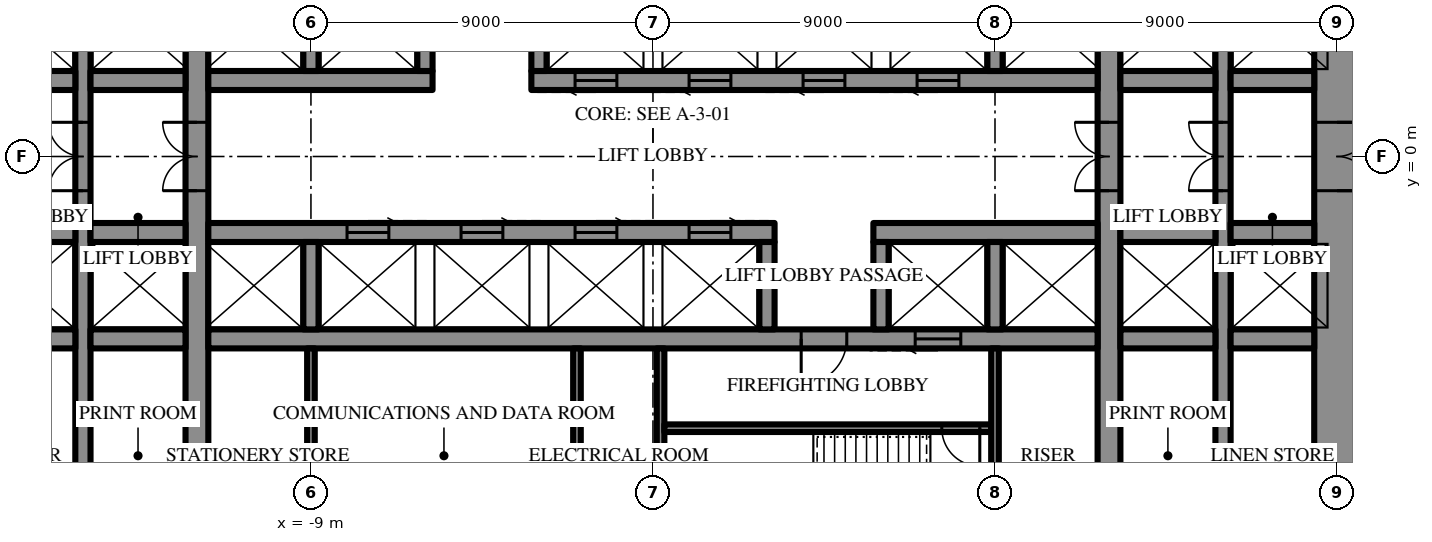
"""IFC4 building model, lengths in metres.
Left out: names, types, materials, properties, quantities, classifications, styles, units other than length and angle.
Written with IfcOpenShell. Run it as: python <this file> out.ifc"""

import sys

from ifc_helpers import new_model, si_unit, direction, frame, frame_2d, origin, place, context, subcontext, project, spatial, rectangle, extrude, element, fill, save


model = new_model("IFC4")
c1 = context("Model", 3, precision=1e-05, world=origin(), true_north=direction((0.0, 1.0)))
c2 = subcontext(c1, "Body", "Model", "MODEL_VIEW")
j1 = project(units=[si_unit("LENGTHUNIT", "METRE"), si_unit("PLANEANGLEUNIT", "RADIAN")], contexts=[c1])
p1 = place(None, origin())
s1 = spatial("IfcSite", under=j1, at=p1, CompositionType="ELEMENT")
p2 = place(p1, origin())
s2 = spatial("IfcBuilding", under=s1, at=p2, CompositionType="ELEMENT")
p3 = place(p2, frame((0.0, 0.0, 103.3)))
s3 = spatial("IfcBuildingStorey", under=s2, at=p3, CompositionType="ELEMENT", Elevation=103.3)
p4 = place(p3, frame((18.0, -10.7, 0.0), z_axis=(0.0, 0.0, 1.0), x_axis=(0.0, 1.0, 0.0)))
e1 = element("IfcWall", 1, at=p4, inside=s3, PredefinedType="SHEAR", context=c2, shape_type="SweptSolid", body=[
    extrude(rectangle(XDim=21.4, YDim=1.2, at=frame_2d((10.7, 0.0))), origin(), (0.0, 0.0, 1.0), 4.2),
])
p5 = place(p4, frame((9.8, 0.0, 0.0)))
e2 = element("IfcOpeningElement", 2, at=p5, cuts=e1, PredefinedType="OPENING", context=c2, shape_type="SweptSolid", body=[
    extrude(rectangle(XDim=1.8, YDim=2.4, at=frame_2d((0.9, 1.2))), frame((0.0, 0.61, 0.0), z_axis=(0.0, -1.0, 0.0), x_axis=(1.0, 0.0, 0.0)), (0.0, 0.0, 1.0), 1.22),
])
p6 = place(p3, frame((12.0, -10.7, 0.0), z_axis=(0.0, 0.0, 1.0), x_axis=(0.0, 1.0, 0.0)))
e3 = element("IfcWall", 3, at=p6, inside=s3, PredefinedType="SHEAR", context=c2, shape_type="SweptSolid", body=[
    extrude(rectangle(XDim=21.4, YDim=0.6, at=frame_2d((10.7, 0.0))), origin(), (0.0, 0.0, 1.0), 4.2),
])
p7 = place(p6, frame((9.8, 0.0, 0.0)))
e4 = element("IfcOpeningElement", 4, at=p7, cuts=e3, PredefinedType="OPENING", context=c2, shape_type="SweptSolid", body=[
    extrude(rectangle(XDim=1.8, YDim=2.4, at=frame_2d((0.9, 1.2))), frame((0.0, 0.31, 0.0), z_axis=(0.0, -1.0, 0.0), x_axis=(1.0, 0.0, 0.0)), (0.0, 0.0, 1.0), 0.62),
])
p8 = place(p3, frame((-12.0, -10.7, 0.0), z_axis=(0.0, 0.0, 1.0), x_axis=(0.0, 1.0, 0.0)))
e5 = element("IfcWall", 5, at=p8, inside=s3, PredefinedType="SHEAR", context=c2, shape_type="SweptSolid", body=[
    extrude(rectangle(XDim=21.4, YDim=0.6, at=frame_2d((10.7, 0.0))), origin(), (0.0, 0.0, 1.0), 4.2),
])
p9 = place(p8, frame((9.8, 0.0, 0.0)))
e6 = element("IfcOpeningElement", 6, at=p9, cuts=e5, PredefinedType="OPENING", context=c2, shape_type="SweptSolid", body=[
    extrude(rectangle(XDim=1.8, YDim=2.4, at=frame_2d((0.9, 1.2))), frame((0.0, 0.31, 0.0), z_axis=(0.0, -1.0, 0.0), x_axis=(1.0, 0.0, 0.0)), (0.0, 0.0, 1.0), 0.62),
])
p10 = place(p3, frame((15.0, -10.7, 0.0), z_axis=(0.0, 0.0, 1.0), x_axis=(0.0, 1.0, 0.0)))
e7 = element("IfcWall", 7, at=p10, inside=s3, PredefinedType="SHEAR", context=c2, shape_type="SweptSolid", body=[
    extrude(rectangle(XDim=21.4, YDim=0.4, at=frame_2d((10.7, 0.0))), origin(), (0.0, 0.0, 1.0), 4.2),
])
p11 = place(p10, frame((9.8, 0.0, 0.0)))
e8 = element("IfcOpeningElement", 8, at=p11, cuts=e7, PredefinedType="OPENING", context=c2, shape_type="SweptSolid", body=[
    extrude(rectangle(XDim=1.8, YDim=2.4, at=frame_2d((0.9, 1.2))), frame((0.0, 0.21, 0.0), z_axis=(0.0, -1.0, 0.0), x_axis=(1.0, 0.0, 0.0)), (0.0, 0.0, 1.0), 0.42),
])
p12 = place(p3, frame((-15.0, -10.7, 0.0), z_axis=(0.0, 0.0, 1.0), x_axis=(0.0, 1.0, 0.0)))
e9 = element("IfcWall", 9, at=p12, inside=s3, PredefinedType="SHEAR", context=c2, shape_type="SweptSolid", body=[
    extrude(rectangle(XDim=21.4, YDim=0.4, at=frame_2d((10.7, 0.0))), origin(), (0.0, 0.0, 1.0), 4.2),
])
p13 = place(p12, frame((9.8, 0.0, 0.0)))
e10 = element("IfcOpeningElement", 10, at=p13, cuts=e9, PredefinedType="OPENING", context=c2, shape_type="SweptSolid", body=[
    extrude(rectangle(XDim=1.8, YDim=2.4, at=frame_2d((0.9, 1.2))), frame((0.0, 0.21, 0.0), z_axis=(0.0, -1.0, 0.0), x_axis=(1.0, 0.0, 0.0)), (0.0, 0.0, 1.0), 0.42),
])
p14 = place(p3, frame((-17.4, 2.0, 0.0), z_axis=(0.0, 0.0, 1.0), x_axis=(1.0, 0.0, 0.0)))
e11 = element("IfcWall", 11, at=p14, inside=s3, PredefinedType="SHEAR", context=c2, shape_type="SweptSolid", body=[
    extrude(rectangle(XDim=2.2, YDim=0.5, at=frame_2d((1.1, 0.0))), origin(), (0.0, 0.0, 1.0), 4.2),
])
p15 = place(p3, frame((-14.8, 2.0, 0.0), z_axis=(0.0, 0.0, 1.0), x_axis=(1.0, 0.0, 0.0)))
e12 = element("IfcWall", 12, at=p15, inside=s3, PredefinedType="SHEAR", context=c2, shape_type="SweptSolid", body=[
    extrude(rectangle(XDim=2.5, YDim=0.5, at=frame_2d((1.25, 0.0))), origin(), (0.0, 0.0, 1.0), 4.2),
])
p16 = place(p3, frame((-11.7, 2.0, 0.0), z_axis=(0.0, 0.0, 1.0), x_axis=(1.0, 0.0, 0.0)))
e13 = element("IfcWall", 13, at=p16, inside=s3, PredefinedType="SHEAR", context=c2, shape_type="SweptSolid", body=[
    extrude(rectangle(XDim=5.9, YDim=0.5, at=frame_2d((2.95, 0.0))), origin(), (0.0, 0.0, 1.0), 4.2),
])
p17 = place(p3, frame((-3.2, 2.0, 0.0), z_axis=(0.0, 0.0, 1.0), x_axis=(1.0, 0.0, 0.0)))
e14 = element("IfcWall", 14, at=p17, inside=s3, PredefinedType="SHEAR", context=c2, shape_type="SweptSolid", body=[
    extrude(rectangle(XDim=14.9, YDim=0.5, at=frame_2d((7.45, 0.0))), origin(), (0.0, 0.0, 1.0), 4.2),
])
p18 = place(p17, frame((1.15, 0.0, 0.0)))
e15 = element("IfcOpeningElement", 15, at=p18, cuts=e14, PredefinedType="OPENING", context=c2, shape_type="SweptSolid", body=[
    extrude(rectangle(XDim=1.1, YDim=2.2, at=frame_2d((0.55, 1.1))), frame((0.0, 0.26, 0.0), z_axis=(0.0, -1.0, 0.0), x_axis=(1.0, 0.0, 0.0)), (0.0, 0.0, 1.0), 0.52),
])
p19 = place(p17, frame((4.15, 0.0, 0.0)))
e16 = element("IfcOpeningElement", 16, at=p19, cuts=e14, PredefinedType="OPENING", context=c2, shape_type="SweptSolid", body=[
    extrude(rectangle(XDim=1.1, YDim=2.2, at=frame_2d((0.55, 1.1))), frame((0.0, 0.26, 0.0), z_axis=(0.0, -1.0, 0.0), x_axis=(1.0, 0.0, 0.0)), (0.0, 0.0, 1.0), 0.52),
])
p20 = place(p17, frame((7.15, 0.0, 0.0)))
e17 = element("IfcOpeningElement", 17, at=p20, cuts=e14, PredefinedType="OPENING", context=c2, shape_type="SweptSolid", body=[
    extrude(rectangle(XDim=1.1, YDim=2.2, at=frame_2d((0.55, 1.1))), frame((0.0, 0.26, 0.0), z_axis=(0.0, -1.0, 0.0), x_axis=(1.0, 0.0, 0.0)), (0.0, 0.0, 1.0), 0.52),
])
p21 = place(p17, frame((10.15, 0.0, 0.0)))
e18 = element("IfcOpeningElement", 18, at=p21, cuts=e14, PredefinedType="OPENING", context=c2, shape_type="SweptSolid", body=[
    extrude(rectangle(XDim=1.1, YDim=2.2, at=frame_2d((0.55, 1.1))), frame((0.0, 0.26, 0.0), z_axis=(0.0, -1.0, 0.0), x_axis=(1.0, 0.0, 0.0)), (0.0, 0.0, 1.0), 0.52),
])
p22 = place(p3, frame((12.3, 2.0, 0.0), z_axis=(0.0, 0.0, 1.0), x_axis=(1.0, 0.0, 0.0)))
e19 = element("IfcWall", 19, at=p22, inside=s3, PredefinedType="SHEAR", context=c2, shape_type="SweptSolid", body=[
    extrude(rectangle(XDim=2.5, YDim=0.5, at=frame_2d((1.25, 0.0))), origin(), (0.0, 0.0, 1.0), 4.2),
])
p23 = place(p3, frame((15.2, 2.0, 0.0), z_axis=(0.0, 0.0, 1.0), x_axis=(1.0, 0.0, 0.0)))
e20 = element("IfcWall", 20, at=p23, inside=s3, PredefinedType="SHEAR", context=c2, shape_type="SweptSolid", body=[
    extrude(rectangle(XDim=2.2, YDim=0.5, at=frame_2d((1.1, 0.0))), origin(), (0.0, 0.0, 1.0), 4.2),
])
for number, where, z_axis, x_axis in (
    (21, (-9.0, 2.25, 0.0), (0.0, 0.0, 1.0), (0.0, 1.0, 0.0)),
    (22, (-6.0, 2.25, 0.0), (0.0, 0.0, 1.0), (0.0, 1.0, 0.0)),
    (23, (-3.0, 2.25, 0.0), (0.0, 0.0, 1.0), (0.0, 1.0, 0.0)),
    (24, (9.0, 2.25, 0.0), (0.0, 0.0, 1.0), (0.0, 1.0, 0.0)),
):
    element("IfcWall", number, at=place(p3, frame(where, z_axis=z_axis, x_axis=x_axis)), inside=s3, PredefinedType="SHEAR", context=c2, shape_type="SweptSolid", body=[
        extrude(rectangle(XDim=2.3, YDim=0.4, at=frame_2d((1.15, 0.0))), origin(), (0.0, 0.0, 1.0), 4.2),
    ])
p24 = place(p3, frame((17.4, -2.0, 0.0), z_axis=(0.0, 0.0, 1.0), x_axis=(-1.0, 0.0, 0.0)))
e25 = element("IfcWall", 25, at=p24, inside=s3, PredefinedType="SHEAR", context=c2, shape_type="SweptSolid", body=[
    extrude(rectangle(XDim=2.2, YDim=0.5, at=frame_2d((1.1, 0.0))), origin(), (0.0, 0.0, 1.0), 4.2),
])
p25 = place(p3, frame((14.8, -2.0, 0.0), z_axis=(0.0, 0.0, 1.0), x_axis=(-1.0, 0.0, 0.0)))
e26 = element("IfcWall", 26, at=p25, inside=s3, PredefinedType="SHEAR", context=c2, shape_type="SweptSolid", body=[
    extrude(rectangle(XDim=2.5, YDim=0.5, at=frame_2d((1.25, 0.0))), origin(), (0.0, 0.0, 1.0), 4.2),
])
p26 = place(p3, frame((11.7, -2.0, 0.0), z_axis=(0.0, 0.0, 1.0), x_axis=(-1.0, 0.0, 0.0)))
e27 = element("IfcWall", 27, at=p26, inside=s3, PredefinedType="SHEAR", context=c2, shape_type="SweptSolid", body=[
    extrude(rectangle(XDim=5.9, YDim=0.5, at=frame_2d((2.95, 0.0))), origin(), (0.0, 0.0, 1.0), 4.2),
])
p27 = place(p3, frame((3.2, -2.0, 0.0), z_axis=(0.0, 0.0, 1.0), x_axis=(-1.0, 0.0, 0.0)))
e28 = element("IfcWall", 28, at=p27, inside=s3, PredefinedType="SHEAR", context=c2, shape_type="SweptSolid", body=[
    extrude(rectangle(XDim=14.9, YDim=0.5, at=frame_2d((7.45, 0.0))), origin(), (0.0, 0.0, 1.0), 4.2),
])
p28 = place(p27, frame((1.15, 0.0, 0.0)))
e29 = element("IfcOpeningElement", 29, at=p28, cuts=e28, PredefinedType="OPENING", context=c2, shape_type="SweptSolid", body=[
    extrude(rectangle(XDim=1.1, YDim=2.2, at=frame_2d((0.55, 1.1))), frame((0.0, 0.26, 0.0), z_axis=(0.0, -1.0, 0.0), x_axis=(1.0, 0.0, 0.0)), (0.0, 0.0, 1.0), 0.52),
])
p29 = place(p27, frame((4.15, 0.0, 0.0)))
e30 = element("IfcOpeningElement", 30, at=p29, cuts=e28, PredefinedType="OPENING", context=c2, shape_type="SweptSolid", body=[
    extrude(rectangle(XDim=1.1, YDim=2.2, at=frame_2d((0.55, 1.1))), frame((0.0, 0.26, 0.0), z_axis=(0.0, -1.0, 0.0), x_axis=(1.0, 0.0, 0.0)), (0.0, 0.0, 1.0), 0.52),
])
p30 = place(p27, frame((7.15, 0.0, 0.0)))
e31 = element("IfcOpeningElement", 31, at=p30, cuts=e28, PredefinedType="OPENING", context=c2, shape_type="SweptSolid", body=[
    extrude(rectangle(XDim=1.1, YDim=2.2, at=frame_2d((0.55, 1.1))), frame((0.0, 0.26, 0.0), z_axis=(0.0, -1.0, 0.0), x_axis=(1.0, 0.0, 0.0)), (0.0, 0.0, 1.0), 0.52),
])
p31 = place(p27, frame((10.15, 0.0, 0.0)))
e32 = element("IfcOpeningElement", 32, at=p31, cuts=e28, PredefinedType="OPENING", context=c2, shape_type="SweptSolid", body=[
    extrude(rectangle(XDim=1.1, YDim=2.2, at=frame_2d((0.55, 1.1))), frame((0.0, 0.26, 0.0), z_axis=(0.0, -1.0, 0.0), x_axis=(1.0, 0.0, 0.0)), (0.0, 0.0, 1.0), 0.52),
])
p32 = place(p3, frame((-12.3, -2.0, 0.0), z_axis=(0.0, 0.0, 1.0), x_axis=(-1.0, 0.0, 0.0)))
e33 = element("IfcWall", 33, at=p32, inside=s3, PredefinedType="SHEAR", context=c2, shape_type="SweptSolid", body=[
    extrude(rectangle(XDim=2.5, YDim=0.5, at=frame_2d((1.25, 0.0))), origin(), (0.0, 0.0, 1.0), 4.2),
])
for number, where, z_axis, x_axis in (
    (34, (-15.2, -2.0, 0.0), (0.0, 0.0, 1.0), (-1.0, 0.0, 0.0)),
    (35, (17.4, -4.8, 0.0), (0.0, 0.0, 1.0), (-1.0, 0.0, 0.0)),
):
    element("IfcWall", number, at=place(p3, frame(where, z_axis=z_axis, x_axis=x_axis)), inside=s3, PredefinedType="SHEAR", context=c2, shape_type="SweptSolid", body=[
        extrude(rectangle(XDim=2.2, YDim=0.5, at=frame_2d((1.1, 0.0))), origin(), (0.0, 0.0, 1.0), 4.2),
    ])
p33 = place(p3, frame((14.8, -4.8, 0.0), z_axis=(0.0, 0.0, 1.0), x_axis=(-1.0, 0.0, 0.0)))
e36 = element("IfcWall", 36, at=p33, inside=s3, PredefinedType="SHEAR", context=c2, shape_type="SweptSolid", body=[
    extrude(rectangle(XDim=2.5, YDim=0.5, at=frame_2d((1.25, 0.0))), origin(), (0.0, 0.0, 1.0), 4.2),
])
p34 = place(p3, frame((11.7, -4.8, 0.0), z_axis=(0.0, 0.0, 1.0), x_axis=(-1.0, 0.0, 0.0)))
e37 = element("IfcWall", 37, at=p34, inside=s3, PredefinedType="SHEAR", context=c2, shape_type="SweptSolid", body=[
    extrude(rectangle(XDim=23.4, YDim=0.5, at=frame_2d((11.7, 0.0))), origin(), (0.0, 0.0, 1.0), 4.2),
])
p35 = place(p34, frame((6.6, 0.0, 0.0)))
e38 = element("IfcOpeningElement", 38, at=p35, cuts=e37, PredefinedType="OPENING", context=c2, shape_type="SweptSolid", body=[
    extrude(rectangle(XDim=1.2, YDim=2.2, at=frame_2d((0.6, 1.1))), frame((0.0, 0.26, 0.0), z_axis=(0.0, -1.0, 0.0), x_axis=(1.0, 0.0, 0.0)), (0.0, 0.0, 1.0), 0.52),
])
p36 = place(p34, frame((3.6, 0.0, 0.0)))
e39 = element("IfcOpeningElement", 39, at=p36, cuts=e37, PredefinedType="OPENING", context=c2, shape_type="SweptSolid", body=[
    extrude(rectangle(XDim=1.2, YDim=2.2, at=frame_2d((0.6, 1.1))), frame((0.0, 0.26, 0.0), z_axis=(0.0, -1.0, 0.0), x_axis=(1.0, 0.0, 0.0)), (0.0, 0.0, 1.0), 0.52),
])
p37 = place(p3, frame((-12.3, -4.8, 0.0), z_axis=(0.0, 0.0, 1.0), x_axis=(-1.0, 0.0, 0.0)))
e40 = element("IfcWall", 40, at=p37, inside=s3, PredefinedType="SHEAR", context=c2, shape_type="SweptSolid", body=[
    extrude(rectangle(XDim=2.5, YDim=0.5, at=frame_2d((1.25, 0.0))), origin(), (0.0, 0.0, 1.0), 4.2),
])
p38 = place(p3, frame((-15.2, -4.8, 0.0), z_axis=(0.0, 0.0, 1.0), x_axis=(-1.0, 0.0, 0.0)))
e41 = element("IfcWall", 41, at=p38, inside=s3, PredefinedType="SHEAR", context=c2, shape_type="SweptSolid", body=[
    extrude(rectangle(XDim=2.2, YDim=0.5, at=frame_2d((1.1, 0.0))), origin(), (0.0, 0.0, 1.0), 4.2),
])
for number, where, z_axis, x_axis in (
    (42, (9.0, -2.25, 0.0), (0.0, 0.0, 1.0), (0.0, -1.0, 0.0)),
    (43, (6.0, -2.25, 0.0), (0.0, 0.0, 1.0), (0.0, -1.0, 0.0)),
    (44, (3.0, -2.25, 0.0), (0.0, 0.0, 1.0), (0.0, -1.0, 0.0)),
    (45, (-9.0, -2.25, 0.0), (0.0, 0.0, 1.0), (0.0, -1.0, 0.0)),
):
    element("IfcWall", number, at=place(p3, frame(where, z_axis=z_axis, x_axis=x_axis)), inside=s3, PredefinedType="SHEAR", context=c2, shape_type="SweptSolid", body=[
        extrude(rectangle(XDim=2.3, YDim=0.4, at=frame_2d((1.15, 0.0))), origin(), (0.0, 0.0, 1.0), 4.2),
    ])
p39 = place(p3, frame((0.2, -5.05, 0.0), z_axis=(0.0, 0.0, 1.0), x_axis=(0.0, -1.0, 0.0)))
e46 = element("IfcWall", 46, at=p39, inside=s3, PredefinedType="SHEAR", context=c2, shape_type="SweptSolid", body=[
    extrude(rectangle(XDim=5.65, YDim=0.2, at=frame_2d((2.825, 0.0))), origin(), (0.0, 0.0, 1.0), 4.2),
])
p40 = place(p3, frame((8.9, -7.15, 0.0), z_axis=(0.0, 0.0, 1.0), x_axis=(-1.0, 0.0, 0.0)))
e47 = element("IfcWall", 47, at=p40, inside=s3, PredefinedType="SHEAR", context=c2, shape_type="SweptSolid", body=[
    extrude(rectangle(XDim=8.6, YDim=0.2, at=frame_2d((4.3, 0.0))), origin(), (0.0, 0.0, 1.0), 4.2),
])
p41 = place(p40, frame((0.3, 0.0, 0.0)))
e48 = element("IfcOpeningElement", 48, at=p41, cuts=e47, PredefinedType="OPENING", context=c2, shape_type="SweptSolid", body=[
    extrude(rectangle(XDim=1.0, YDim=2.2, at=frame_2d((0.5, 1.1))), frame((0.0, 0.11, 0.0), z_axis=(0.0, -1.0, 0.0), x_axis=(1.0, 0.0, 0.0)), (0.0, 0.0, 1.0), 0.22),
])
for number, where, z_axis, x_axis in (
    (49, (9.0, -5.05, 0.0), (0.0, 0.0, 1.0), (0.0, -1.0, 0.0)),
    (50, (-9.0, -5.05, 0.0), (0.0, 0.0, 1.0), (0.0, -1.0, 0.0)),
    (51, (-2.0, -5.05, 0.0), (0.0, 0.0, 1.0), (0.0, -1.0, 0.0)),
):
    element("IfcWall", number, at=place(p3, frame(where, z_axis=z_axis, x_axis=x_axis)), inside=s3, PredefinedType="PARTITIONING", context=c2, shape_type="SweptSolid", body=[
        extrude(rectangle(XDim=5.65, YDim=0.2, at=frame_2d((2.825, 0.0))), origin(), (0.0, 0.0, 1.0), 3.9),
    ])
p42 = place(p5, frame((1.8, 0.0, 0.0), z_axis=(0.0, 0.0, 1.0), x_axis=(-1.0, 0.0, 0.0)))
e52 = element("IfcDoor", 52, at=p42, inside=s3, OperationType="DOUBLE_DOOR_SINGLE_SWING", PredefinedType="DOOR", context=c2, shape_type="SweptSolid", body=[
    extrude(rectangle(XDim=1.8, YDim=2.4, at=frame_2d((0.9, 1.2))), frame((0.0, 0.025, 0.0), z_axis=(0.0, -1.0, 0.0), x_axis=(1.0, 0.0, 0.0)), (0.0, 0.0, 1.0), 0.05),
])
fill(e2, e52)
p43 = place(p35, origin())
e53 = element("IfcDoor", 53, at=p43, inside=s3, OperationType="SINGLE_SWING_LEFT", PredefinedType="DOOR", context=c2, shape_type="SweptSolid", body=[
    extrude(rectangle(XDim=1.2, YDim=2.2, at=frame_2d((0.6, 1.1))), frame((0.0, 0.025, 0.0), z_axis=(0.0, -1.0, 0.0), x_axis=(1.0, 0.0, 0.0)), (0.0, 0.0, 1.0), 0.05),
])
fill(e38, e53)
p44 = place(p41, origin())
e54 = element("IfcDoor", 54, at=p44, inside=s3, OperationType="SINGLE_SWING_RIGHT", PredefinedType="DOOR", context=c2, shape_type="SweptSolid", body=[
    extrude(rectangle(XDim=1.0, YDim=2.2, at=frame_2d((0.5, 1.1))), frame((0.0, 0.025, 0.0), z_axis=(0.0, -1.0, 0.0), x_axis=(1.0, 0.0, 0.0)), (0.0, 0.0, 1.0), 0.05),
])
fill(e48, e54)
p45 = place(p7, origin())
e55 = element("IfcDoor", 55, at=p45, inside=s3, OperationType="DOUBLE_DOOR_SINGLE_SWING", PredefinedType="DOOR", context=c2, shape_type="SweptSolid", body=[
    extrude(rectangle(XDim=1.8, YDim=2.4, at=frame_2d((0.9, 1.2))), frame((0.0, 0.025, 0.0), z_axis=(0.0, -1.0, 0.0), x_axis=(1.0, 0.0, 0.0)), (0.0, 0.0, 1.0), 0.05),
])
fill(e4, e55)
p46 = place(p9, origin())
e56 = element("IfcDoor", 56, at=p46, inside=s3, OperationType="DOUBLE_DOOR_SINGLE_SWING", PredefinedType="DOOR", context=c2, shape_type="SweptSolid", body=[
    extrude(rectangle(XDim=1.8, YDim=2.4, at=frame_2d((0.9, 1.2))), frame((0.0, 0.025, 0.0), z_axis=(0.0, -1.0, 0.0), x_axis=(1.0, 0.0, 0.0)), (0.0, 0.0, 1.0), 0.05),
])
fill(e6, e56)
p47 = place(p11, origin())
e57 = element("IfcDoor", 57, at=p47, inside=s3, OperationType="DOUBLE_DOOR_SINGLE_SWING", PredefinedType="DOOR", context=c2, shape_type="SweptSolid", body=[
    extrude(rectangle(XDim=1.8, YDim=2.4, at=frame_2d((0.9, 1.2))), frame((0.0, 0.025, 0.0), z_axis=(0.0, -1.0, 0.0), x_axis=(1.0, 0.0, 0.0)), (0.0, 0.0, 1.0), 0.05),
])
fill(e8, e57)
p48 = place(p13, origin())
e58 = element("IfcDoor", 58, at=p48, inside=s3, OperationType="DOUBLE_DOOR_SINGLE_SWING", PredefinedType="DOOR", context=c2, shape_type="SweptSolid", body=[
    extrude(rectangle(XDim=1.8, YDim=2.4, at=frame_2d((0.9, 1.2))), frame((0.0, 0.025, 0.0), z_axis=(0.0, -1.0, 0.0), x_axis=(1.0, 0.0, 0.0)), (0.0, 0.0, 1.0), 0.05),
])
fill(e10, e58)
p49 = place(p18, frame((1.1, 0.0, 0.0), z_axis=(0.0, 0.0, 1.0), x_axis=(-1.0, 0.0, 0.0)))
e59 = element("IfcDoor", 59, at=p49, inside=s3, OperationType="SLIDING_TO_LEFT", PredefinedType="DOOR", context=c2, shape_type="SweptSolid", body=[
    extrude(rectangle(XDim=1.1, YDim=2.2, at=frame_2d((0.55, 1.1))), frame((0.0, 0.025, 0.0), z_axis=(0.0, -1.0, 0.0), x_axis=(1.0, 0.0, 0.0)), (0.0, 0.0, 1.0), 0.05),
])
fill(e15, e59)
p50 = place(p19, frame((1.1, 0.0, 0.0), z_axis=(0.0, 0.0, 1.0), x_axis=(-1.0, 0.0, 0.0)))
e60 = element("IfcDoor", 60, at=p50, inside=s3, OperationType="SLIDING_TO_LEFT", PredefinedType="DOOR", context=c2, shape_type="SweptSolid", body=[
    extrude(rectangle(XDim=1.1, YDim=2.2, at=frame_2d((0.55, 1.1))), frame((0.0, 0.025, 0.0), z_axis=(0.0, -1.0, 0.0), x_axis=(1.0, 0.0, 0.0)), (0.0, 0.0, 1.0), 0.05),
])
fill(e16, e60)
p51 = place(p20, frame((1.1, 0.0, 0.0), z_axis=(0.0, 0.0, 1.0), x_axis=(-1.0, 0.0, 0.0)))
e61 = element("IfcDoor", 61, at=p51, inside=s3, OperationType="SLIDING_TO_LEFT", PredefinedType="DOOR", context=c2, shape_type="SweptSolid", body=[
    extrude(rectangle(XDim=1.1, YDim=2.2, at=frame_2d((0.55, 1.1))), frame((0.0, 0.025, 0.0), z_axis=(0.0, -1.0, 0.0), x_axis=(1.0, 0.0, 0.0)), (0.0, 0.0, 1.0), 0.05),
])
fill(e17, e61)
p52 = place(p21, frame((1.1, 0.0, 0.0), z_axis=(0.0, 0.0, 1.0), x_axis=(-1.0, 0.0, 0.0)))
e62 = element("IfcDoor", 62, at=p52, inside=s3, OperationType="SLIDING_TO_LEFT", PredefinedType="DOOR", context=c2, shape_type="SweptSolid", body=[
    extrude(rectangle(XDim=1.1, YDim=2.2, at=frame_2d((0.55, 1.1))), frame((0.0, 0.025, 0.0), z_axis=(0.0, -1.0, 0.0), x_axis=(1.0, 0.0, 0.0)), (0.0, 0.0, 1.0), 0.05),
])
fill(e18, e62)
p53 = place(p36, origin())
e63 = element("IfcDoor", 63, at=p53, inside=s3, OperationType="SLIDING_TO_LEFT", PredefinedType="DOOR", context=c2, shape_type="SweptSolid", body=[
    extrude(rectangle(XDim=1.2, YDim=2.2, at=frame_2d((0.6, 1.1))), frame((0.0, 0.025, 0.0), z_axis=(0.0, -1.0, 0.0), x_axis=(1.0, 0.0, 0.0)), (0.0, 0.0, 1.0), 0.05),
])
fill(e39, e63)
p54 = place(p28, frame((1.1, 0.0, 0.0), z_axis=(0.0, 0.0, 1.0), x_axis=(-1.0, 0.0, 0.0)))
e64 = element("IfcDoor", 64, at=p54, inside=s3, OperationType="SLIDING_TO_LEFT", PredefinedType="DOOR", context=c2, shape_type="SweptSolid", body=[
    extrude(rectangle(XDim=1.1, YDim=2.2, at=frame_2d((0.55, 1.1))), frame((0.0, 0.025, 0.0), z_axis=(0.0, -1.0, 0.0), x_axis=(1.0, 0.0, 0.0)), (0.0, 0.0, 1.0), 0.05),
])
fill(e29, e64)
p55 = place(p29, frame((1.1, 0.0, 0.0), z_axis=(0.0, 0.0, 1.0), x_axis=(-1.0, 0.0, 0.0)))
e65 = element("IfcDoor", 65, at=p55, inside=s3, OperationType="SLIDING_TO_LEFT", PredefinedType="DOOR", context=c2, shape_type="SweptSolid", body=[
    extrude(rectangle(XDim=1.1, YDim=2.2, at=frame_2d((0.55, 1.1))), frame((0.0, 0.025, 0.0), z_axis=(0.0, -1.0, 0.0), x_axis=(1.0, 0.0, 0.0)), (0.0, 0.0, 1.0), 0.05),
])
fill(e30, e65)
p56 = place(p30, frame((1.1, 0.0, 0.0), z_axis=(0.0, 0.0, 1.0), x_axis=(-1.0, 0.0, 0.0)))
e66 = element("IfcDoor", 66, at=p56, inside=s3, OperationType="SLIDING_TO_LEFT", PredefinedType="DOOR", context=c2, shape_type="SweptSolid", body=[
    extrude(rectangle(XDim=1.1, YDim=2.2, at=frame_2d((0.55, 1.1))), frame((0.0, 0.025, 0.0), z_axis=(0.0, -1.0, 0.0), x_axis=(1.0, 0.0, 0.0)), (0.0, 0.0, 1.0), 0.05),
])
fill(e31, e66)
p57 = place(p31, frame((1.1, 0.0, 0.0), z_axis=(0.0, 0.0, 1.0), x_axis=(-1.0, 0.0, 0.0)))
e67 = element("IfcDoor", 67, at=p57, inside=s3, OperationType="SLIDING_TO_LEFT", PredefinedType="DOOR", context=c2, shape_type="SweptSolid", body=[
    extrude(rectangle(XDim=1.1, YDim=2.2, at=frame_2d((0.55, 1.1))), frame((0.0, 0.025, 0.0), z_axis=(0.0, -1.0, 0.0), x_axis=(1.0, 0.0, 0.0)), (0.0, 0.0, 1.0), 0.05),
])
fill(e32, e67)
save(model, sys.argv[1])
